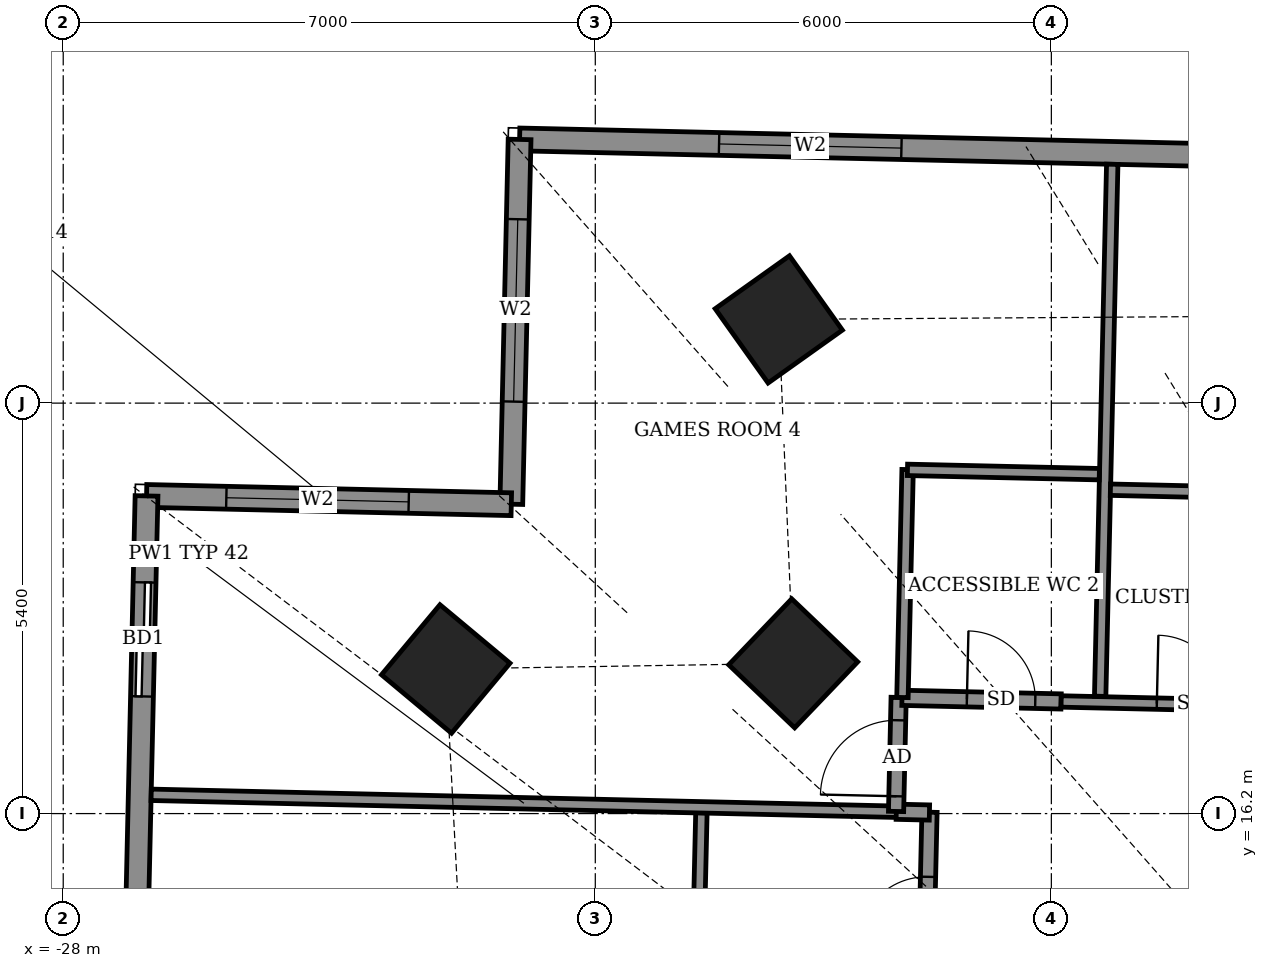
"""IFC4 building model, lengths in metres.
Left out: names, types, materials, properties, quantities, classifications, styles, units other than length and angle.
Written with IfcOpenShell. Run it as: python <this file> out.ifc"""

import sys

from ifc_helpers import new_model, si_unit, direction, frame, frame_2d, origin, origin_2d, place, context, subcontext, project, spatial, rectangle, extrude, element, fill, save


model = new_model("IFC4")
c1 = context("Model", 3, precision=1e-05, world=origin(), true_north=direction((0.0, 1.0)))
c2 = subcontext(c1, "Body", "Model", "MODEL_VIEW")
j1 = project(units=[si_unit("LENGTHUNIT", "METRE"), si_unit("PLANEANGLEUNIT", "RADIAN")], contexts=[c1])
p1 = place(None, origin())
s1 = spatial("IfcSite", under=j1, at=p1, CompositionType="ELEMENT")
p2 = place(p1, origin())
s2 = spatial("IfcBuilding", under=s1, at=p2, CompositionType="ELEMENT")
p3 = place(p2, frame((0.0, 0.0, 193.3)))
s3 = spatial("IfcBuildingStorey", under=s2, at=p3, CompositionType="ELEMENT", Elevation=193.3)
for number, where, z_axis, x_axis in (
    (1, (-18.586, 22.701, -0.55), (0.0, 0.0, 1.0), (-0.815, -0.58, 0.0)),
    (2, (-18.396, 18.177, -0.55), (0.0, 0.0, 1.0), (-0.691, -0.723, 0.0)),
    (3, (-22.968, 18.103, -0.55), (0.0, 0.0, 1.0), (-0.641, -0.768, 0.0)),
):
    element("IfcColumn", number, at=place(p3, frame(where, z_axis=z_axis, x_axis=x_axis)), inside=s3, PredefinedType="COLUMN", context=c2, shape_type="SweptSolid", body=[
        extrude(rectangle(XDim=1.2, YDim=1.2, at=origin_2d()), origin(), (0.0, 0.0, 1.0), 4.6),
    ])
p4 = place(p3, frame((20.437, 24.106, 0.0), z_axis=(0.0, 0.0, 1.0), x_axis=(-0.999742506232, 0.022691875925, 0.0)))
e4 = element("IfcWall", 4, at=p4, inside=s3, PredefinedType="SOLIDWALL", context=c2, shape_type="SweptSolid", body=[
    extrude(rectangle(XDim=42.444, YDim=0.3, at=frame_2d((21.222, 0.0))), origin(), (0.0, 0.0, 1.0), 2.65),
])
p5 = place(p4, frame((1.711, 0.0, 0.0)))
e5 = element("IfcOpeningElement", 5, at=p5, cuts=e4, PredefinedType="OPENING", context=c2, shape_type="SweptSolid", body=[
    extrude(rectangle(XDim=1.5, YDim=2.4, at=frame_2d((0.75, 1.2))), frame((0.0, 0.16, 0.0), z_axis=(0.0, -1.0, 0.0), x_axis=(1.0, 0.0, 0.0)), (0.0, 0.0, 1.0), 0.32),
])
p6 = place(p4, frame((7.769, 0.0, 0.9)))
e6 = element("IfcOpeningElement", 6, at=p6, cuts=e4, PredefinedType="OPENING", context=c2, shape_type="SweptSolid", body=[
    extrude(rectangle(XDim=2.4, YDim=1.5, at=frame_2d((1.2, 0.75))), frame((0.0, 0.16, 0.0), z_axis=(0.0, -1.0, 0.0), x_axis=(1.0, 0.0, 0.0)), (0.0, 0.0, 1.0), 0.32),
])
p7 = place(p4, frame((15.321, 0.0, 0.9)))
e7 = element("IfcOpeningElement", 7, at=p7, cuts=e4, PredefinedType="OPENING", context=c2, shape_type="SweptSolid", body=[
    extrude(rectangle(XDim=2.4, YDim=1.5, at=frame_2d((1.2, 0.75))), frame((0.0, 0.16, 0.0), z_axis=(0.0, -1.0, 0.0), x_axis=(1.0, 0.0, 0.0)), (0.0, 0.0, 1.0), 0.32),
])
p8 = place(p4, frame((22.142, 0.0, 0.0)))
e8 = element("IfcOpeningElement", 8, at=p8, cuts=e4, PredefinedType="OPENING", context=c2, shape_type="SweptSolid", body=[
    extrude(rectangle(XDim=1.5, YDim=2.4, at=frame_2d((0.75, 1.2))), frame((0.0, 0.16, 0.0), z_axis=(0.0, -1.0, 0.0), x_axis=(1.0, 0.0, 0.0)), (0.0, 0.0, 1.0), 0.32),
])
p9 = place(p4, frame((29.444, 0.0, 0.9)))
e9 = element("IfcOpeningElement", 9, at=p9, cuts=e4, PredefinedType="OPENING", context=c2, shape_type="SweptSolid", body=[
    extrude(rectangle(XDim=2.4, YDim=1.5, at=frame_2d((1.2, 0.75))), frame((0.0, 0.16, 0.0), z_axis=(0.0, -1.0, 0.0), x_axis=(1.0, 0.0, 0.0)), (0.0, 0.0, 1.0), 0.32),
])
p10 = place(p4, frame((37.419, 0.0, 0.9)))
e10 = element("IfcOpeningElement", 10, at=p10, cuts=e4, PredefinedType="OPENING", context=c2, shape_type="SweptSolid", body=[
    extrude(rectangle(XDim=2.4, YDim=1.5, at=frame_2d((1.2, 0.75))), frame((0.0, 0.16, 0.0), z_axis=(0.0, -1.0, 0.0), x_axis=(1.0, 0.0, 0.0)), (0.0, 0.0, 1.0), 0.32),
])
p11 = place(p3, frame((-21.996, 25.069, 0.0), z_axis=(0.0, 0.0, 1.0), x_axis=(-0.022683280499, -0.999742701292, 0.0)))
e11 = element("IfcWall", 11, at=p11, inside=s3, PredefinedType="SOLIDWALL", context=c2, shape_type="SweptSolid", body=[
    extrude(rectangle(XDim=4.8, YDim=0.3, at=frame_2d((2.4, 0.0))), origin(), (0.0, 0.0, 1.0), 2.85),
])
p12 = place(p11, frame((1.05, 0.0, 0.9)))
e12 = element("IfcOpeningElement", 12, at=p12, cuts=e11, PredefinedType="OPENING", context=c2, shape_type="SweptSolid", body=[
    extrude(rectangle(XDim=2.4, YDim=1.5, at=frame_2d((1.2, 0.75))), frame((0.0, 0.16, 0.0), z_axis=(0.0, -1.0, 0.0), x_axis=(1.0, 0.0, 0.0)), (0.0, 0.0, 1.0), 0.32),
])
p13 = place(p3, frame((-22.105, 20.27, 0.0), z_axis=(0.0, 0.0, 1.0), x_axis=(-0.999742701292, 0.022683280499, 0.0)))
e13 = element("IfcWall", 13, at=p13, inside=s3, PredefinedType="SOLIDWALL", context=c2, shape_type="SweptSolid", body=[
    extrude(rectangle(XDim=4.8, YDim=0.3, at=frame_2d((2.4, 0.0))), origin(), (0.0, 0.0, 1.0), 2.85),
])
p14 = place(p13, frame((1.35, 0.0, 0.9)))
e14 = element("IfcOpeningElement", 14, at=p14, cuts=e13, PredefinedType="OPENING", context=c2, shape_type="SweptSolid", body=[
    extrude(rectangle(XDim=2.4, YDim=1.5, at=frame_2d((1.2, 0.75))), frame((0.0, 0.16, 0.0), z_axis=(0.0, -1.0, 0.0), x_axis=(1.0, 0.0, 0.0)), (0.0, 0.0, 1.0), 0.32),
])
p15 = place(p3, frame((-26.904, 20.379, 0.0), z_axis=(0.0, 0.0, 1.0), x_axis=(-0.022669030322, -0.999743024514, 0.0)))
e15 = element("IfcWall", 15, at=p15, inside=s3, PredefinedType="SOLIDWALL", context=c2, shape_type="SweptSolid", body=[
    extrude(rectangle(XDim=11.33, YDim=0.3, at=frame_2d((5.665, 0.0))), origin(), (0.0, 0.0, 1.0), 2.85),
])
p16 = place(p15, frame((1.138, 0.0, 0.0)))
e16 = element("IfcOpeningElement", 16, at=p16, cuts=e15, PredefinedType="OPENING", context=c2, shape_type="SweptSolid", body=[
    extrude(rectangle(XDim=1.5, YDim=2.4, at=frame_2d((0.75, 1.2))), frame((0.0, 0.16, 0.0), z_axis=(0.0, -1.0, 0.0), x_axis=(1.0, 0.0, 0.0)), (0.0, 0.0, 1.0), 0.32),
])
p17 = place(p15, frame((6.4, 0.0, 0.9)))
e17 = element("IfcOpeningElement", 17, at=p17, cuts=e15, PredefinedType="OPENING", context=c2, shape_type="SweptSolid", body=[
    extrude(rectangle(XDim=2.4, YDim=1.5, at=frame_2d((1.2, 0.75))), frame((0.0, 0.16, 0.0), z_axis=(0.0, -1.0, 0.0), x_axis=(1.0, 0.0, 0.0)), (0.0, 0.0, 1.0), 0.32),
])
p18 = place(p3, frame((-17.247, -12.149, 0.0), z_axis=(0.0, 0.0, 1.0), x_axis=(0.022698146637, 0.999742363881, 0.0)))
e18 = element("IfcWall", 18, at=p18, inside=s3, PredefinedType="PARTITIONING", context=c2, shape_type="SweptSolid", body=[
    extrude(rectangle(XDim=28.374, YDim=0.2, at=frame_2d((14.187, 0.0))), origin(), (0.0, 0.0, 1.0), 2.85),
])
p19 = place(p18, frame((22.9, 0.0, 0.0)))
e19 = element("IfcOpeningElement", 19, at=p19, cuts=e18, PredefinedType="OPENING", context=c2, shape_type="SweptSolid", body=[
    extrude(rectangle(XDim=1.0, YDim=2.1, at=frame_2d((0.5, 1.05))), frame((0.0, 0.11, 0.0), z_axis=(0.0, -1.0, 0.0), x_axis=(1.0, 0.0, 0.0)), (0.0, 0.0, 1.0), 0.22),
])
p20 = place(p18, frame((26.624, 0.0, 0.0)))
e20 = element("IfcOpeningElement", 20, at=p20, cuts=e18, PredefinedType="OPENING", context=c2, shape_type="SweptSolid", body=[
    extrude(rectangle(XDim=0.9, YDim=2.1, at=frame_2d((0.45, 1.05))), frame((0.0, 0.11, 0.0), z_axis=(0.0, -1.0, 0.0), x_axis=(1.0, 0.0, 0.0)), (0.0, 0.0, 1.0), 0.22),
])
p21 = place(p18, frame((16.5, 0.0, 0.0)))
e21 = element("IfcOpeningElement", 21, at=p21, cuts=e18, PredefinedType="OPENING", context=c2, shape_type="SweptSolid", body=[
    extrude(rectangle(XDim=1.0, YDim=2.1, at=frame_2d((0.5, 1.05))), frame((0.0, 0.11, 0.0), z_axis=(0.0, -1.0, 0.0), x_axis=(1.0, 0.0, 0.0)), (0.0, 0.0, 1.0), 0.22),
])
p22 = place(p18, frame((19.275, 0.0, 0.0)))
e22 = element("IfcOpeningElement", 22, at=p22, cuts=e18, PredefinedType="OPENING", context=c2, shape_type="SweptSolid", body=[
    extrude(rectangle(XDim=0.9, YDim=2.1, at=frame_2d((0.45, 1.05))), frame((0.0, 0.11, 0.0), z_axis=(0.0, -1.0, 0.0), x_axis=(1.0, 0.0, 0.0)), (0.0, 0.0, 1.0), 0.22),
])
p23 = place(p18, frame((14.0, 0.0, 0.0)))
e23 = element("IfcOpeningElement", 23, at=p23, cuts=e18, PredefinedType="OPENING", context=c2, shape_type="SweptSolid", body=[
    extrude(rectangle(XDim=1.0, YDim=2.1, at=frame_2d((0.5, 1.05))), frame((0.0, 0.11, 0.0), z_axis=(0.0, -1.0, 0.0), x_axis=(1.0, 0.0, 0.0)), (0.0, 0.0, 1.0), 0.22),
])
p24 = place(p18, frame((11.775, 0.0, 0.0)))
e24 = element("IfcOpeningElement", 24, at=p24, cuts=e18, PredefinedType="OPENING", context=c2, shape_type="SweptSolid", body=[
    extrude(rectangle(XDim=0.9, YDim=2.1, at=frame_2d((0.45, 1.05))), frame((0.0, 0.11, 0.0), z_axis=(0.0, -1.0, 0.0), x_axis=(1.0, 0.0, 0.0)), (0.0, 0.0, 1.0), 0.22),
])
p25 = place(p18, frame((8.712, 0.0, 0.0)))
e25 = element("IfcOpeningElement", 25, at=p25, cuts=e18, PredefinedType="OPENING", context=c2, shape_type="SweptSolid", body=[
    extrude(rectangle(XDim=1.0, YDim=2.1, at=frame_2d((0.5, 1.05))), frame((0.0, 0.11, 0.0), z_axis=(0.0, -1.0, 0.0), x_axis=(1.0, 0.0, 0.0)), (0.0, 0.0, 1.0), 0.22),
])
p26 = place(p18, frame((3.138, 0.0, 0.0)))
e26 = element("IfcOpeningElement", 26, at=p26, cuts=e18, PredefinedType="OPENING", context=c2, shape_type="SweptSolid", body=[
    extrude(rectangle(XDim=1.0, YDim=2.1, at=frame_2d((0.5, 1.05))), frame((0.0, 0.11, 0.0), z_axis=(0.0, -1.0, 0.0), x_axis=(1.0, 0.0, 0.0)), (0.0, 0.0, 1.0), 0.22),
])
p27 = place(p3, frame((-19.662, 13.687, 0.0), z_axis=(0.0, 0.0, 1.0), x_axis=(0.023015762656, 0.999735102249, 0.0)))
e27 = element("IfcWall", 27, at=p27, inside=s3, PredefinedType="PARTITIONING", context=c2, shape_type="SweptSolid", body=[
    extrude(rectangle(XDim=2.525, YDim=0.15, at=frame_2d((1.262, 0.0))), origin(), (0.0, 0.0, 1.0), 2.85),
])
p28 = place(p3, frame((-26.843, 16.447, 0.0), z_axis=(0.0, 0.0, 1.0), x_axis=(0.999741809847, -0.022722536032, 0.0)))
e28 = element("IfcWall", 28, at=p28, inside=s3, PredefinedType="PARTITIONING", context=c2, shape_type="SweptSolid", body=[
    extrude(rectangle(XDim=9.81, YDim=0.15, at=frame_2d((4.905, 0.0))), origin(), (0.0, 0.0, 1.0), 2.65),
])
p29 = place(p3, frame((-17.04, 16.224, 0.0), z_axis=(0.0, 0.0, 1.0), x_axis=(0.999736607625, -0.022950280466, 0.0)))
e29 = element("IfcWall", 29, at=p29, inside=s3, PredefinedType="PARTITIONING", context=c2, shape_type="SweptSolid", body=[
    extrude(rectangle(XDim=0.436, YDim=0.2, at=frame_2d((0.218, 0.0))), origin(), (0.0, 0.0, 1.0), 2.85),
])
p30 = place(p3, frame((-17.043, 16.228, 0.0), z_axis=(0.0, 0.0, 1.0), x_axis=(0.022617910375, 0.999744182344, 0.0)))
e30 = element("IfcWall", 30, at=p30, inside=s3, PredefinedType="PARTITIONING", context=c2, shape_type="SweptSolid", body=[
    extrude(rectangle(XDim=1.5, YDim=0.2, at=frame_2d((0.75, 0.0))), origin(), (0.0, 0.0, 1.0), 2.85),
])
p31 = place(p30, frame((0.2, 0.0, 0.0)))
e31 = element("IfcOpeningElement", 31, at=p31, cuts=e30, PredefinedType="OPENING", context=c2, shape_type="SweptSolid", body=[
    extrude(rectangle(XDim=1.0, YDim=2.1, at=frame_2d((0.5, 1.05))), frame((0.0, 0.11, 0.0), z_axis=(0.0, -1.0, 0.0), x_axis=(1.0, 0.0, 0.0)), (0.0, 0.0, 1.0), 0.22),
])
p32 = place(p3, frame((-16.965, 17.723, 0.0), z_axis=(0.0, 0.0, 1.0), x_axis=(0.999738756022, -0.022856502529, 0.0)))
e32 = element("IfcWall", 32, at=p32, inside=s3, PredefinedType="PARTITIONING", context=c2, shape_type="SweptSolid", body=[
    extrude(rectangle(XDim=2.094, YDim=0.2, at=frame_2d((1.047, 0.0))), origin(), (0.0, 0.0, 1.0), 2.85),
])
p33 = place(p32, frame((0.854, 0.0, 0.0)))
e33 = element("IfcOpeningElement", 33, at=p33, cuts=e32, PredefinedType="OPENING", context=c2, shape_type="SweptSolid", body=[
    extrude(rectangle(XDim=0.9, YDim=2.1, at=frame_2d((0.45, 1.05))), frame((0.0, 0.11, 0.0), z_axis=(0.0, -1.0, 0.0), x_axis=(1.0, 0.0, 0.0)), (0.0, 0.0, 1.0), 0.22),
])
p34 = place(p3, frame((-14.871, 17.675, 0.0), z_axis=(0.0, 0.0, 1.0), x_axis=(0.999742359486, -0.02269834024, 0.0)))
e34 = element("IfcWall", 34, at=p34, inside=s3, PredefinedType="PARTITIONING", context=c2, shape_type="SweptSolid", body=[
    extrude(rectangle(XDim=30.536, YDim=0.15, at=frame_2d((15.268, 0.0))), origin(), (0.0, 0.0, 1.0), 2.55),
])
p35 = place(p34, frame((24.184, 0.0, 0.0)))
e35 = element("IfcOpeningElement", 35, at=p35, cuts=e34, PredefinedType="OPENING", context=c2, shape_type="SweptSolid", body=[
    extrude(rectangle(XDim=1.0, YDim=2.1, at=frame_2d((0.5, 1.05))), frame((0.0, 0.085, 0.0), z_axis=(0.0, -1.0, 0.0), x_axis=(1.0, 0.0, 0.0)), (0.0, 0.0, 1.0), 0.17),
])
p36 = place(p34, frame((27.359, 0.0, 0.0)))
e36 = element("IfcOpeningElement", 36, at=p36, cuts=e34, PredefinedType="OPENING", context=c2, shape_type="SweptSolid", body=[
    extrude(rectangle(XDim=0.9, YDim=2.1, at=frame_2d((0.45, 1.05))), frame((0.0, 0.085, 0.0), z_axis=(0.0, -1.0, 0.0), x_axis=(1.0, 0.0, 0.0)), (0.0, 0.0, 1.0), 0.17),
])
p37 = place(p34, frame((19.459, 0.0, 0.0)))
e37 = element("IfcOpeningElement", 37, at=p37, cuts=e34, PredefinedType="OPENING", context=c2, shape_type="SweptSolid", body=[
    extrude(rectangle(XDim=1.0, YDim=2.1, at=frame_2d((0.5, 1.05))), frame((0.0, 0.085, 0.0), z_axis=(0.0, -1.0, 0.0), x_axis=(1.0, 0.0, 0.0)), (0.0, 0.0, 1.0), 0.17),
])
p38 = place(p34, frame((15.509, 0.0, 0.0)))
e38 = element("IfcOpeningElement", 38, at=p38, cuts=e34, PredefinedType="OPENING", context=c2, shape_type="SweptSolid", body=[
    extrude(rectangle(XDim=0.9, YDim=2.1, at=frame_2d((0.45, 1.05))), frame((0.0, 0.085, 0.0), z_axis=(0.0, -1.0, 0.0), x_axis=(1.0, 0.0, 0.0)), (0.0, 0.0, 1.0), 0.17),
])
p39 = place(p34, frame((11.134, 0.0, 0.0)))
e39 = element("IfcOpeningElement", 39, at=p39, cuts=e34, PredefinedType="OPENING", context=c2, shape_type="SweptSolid", body=[
    extrude(rectangle(XDim=1.0, YDim=2.1, at=frame_2d((0.5, 1.05))), frame((0.0, 0.085, 0.0), z_axis=(0.0, -1.0, 0.0), x_axis=(1.0, 0.0, 0.0)), (0.0, 0.0, 1.0), 0.17),
])
p40 = place(p34, frame((5.209, 0.0, 0.0)))
e40 = element("IfcOpeningElement", 40, at=p40, cuts=e34, PredefinedType="OPENING", context=c2, shape_type="SweptSolid", body=[
    extrude(rectangle(XDim=1.0, YDim=2.1, at=frame_2d((0.5, 1.05))), frame((0.0, 0.085, 0.0), z_axis=(0.0, -1.0, 0.0), x_axis=(1.0, 0.0, 0.0)), (0.0, 0.0, 1.0), 0.17),
])
p41 = place(p34, frame((1.259, 0.0, 0.0)))
e41 = element("IfcOpeningElement", 41, at=p41, cuts=e34, PredefinedType="OPENING", context=c2, shape_type="SweptSolid", body=[
    extrude(rectangle(XDim=0.9, YDim=2.1, at=frame_2d((0.45, 1.05))), frame((0.0, 0.085, 0.0), z_axis=(0.0, -1.0, 0.0), x_axis=(1.0, 0.0, 0.0)), (0.0, 0.0, 1.0), 0.17),
])
p42 = place(p3, frame((-16.959, 17.727, 0.0), z_axis=(0.0, 0.0, 1.0), x_axis=(0.022625271604, 0.999744015778, 0.0)))
e42 = element("IfcWall", 42, at=p42, inside=s3, PredefinedType="PARTITIONING", context=c2, shape_type="SweptSolid", body=[
    extrude(rectangle(XDim=3.0, YDim=0.15, at=frame_2d((1.5, 0.0))), origin(), (0.0, 0.0, 1.0), 2.85),
])
p43 = place(p3, frame((-14.358, 17.743, 0.0), z_axis=(0.0, 0.0, 1.0), x_axis=(0.022702393474, 0.999742267452, 0.0)))
e43 = element("IfcWall", 43, at=p43, inside=s3, PredefinedType="PARTITIONING", context=c2, shape_type="SweptSolid", body=[
    extrude(rectangle(XDim=7.001, YDim=0.15, at=frame_2d((3.5, 0.0))), origin(), (0.0, 0.0, 1.0), 2.65),
])
p44 = place(p3, frame((-14.223, 20.461, 0.0), z_axis=(0.0, 0.0, 1.0), x_axis=(0.999740260747, -0.02279059109, 0.0)))
e44 = element("IfcWall", 44, at=p44, inside=s3, PredefinedType="PARTITIONING", context=c2, shape_type="SweptSolid", body=[
    extrude(rectangle(XDim=2.324, YDim=0.15, at=frame_2d((1.162, 0.0))), origin(), (0.0, 0.0, 1.0), 2.75),
])
p45 = place(p3, frame((-16.893, 20.722, 0.0), z_axis=(0.0, 0.0, 1.0), x_axis=(0.999746160391, -0.022530308093, 0.0)))
e45 = element("IfcWall", 45, at=p45, inside=s3, PredefinedType="PARTITIONING", context=c2, shape_type="SweptSolid", body=[
    extrude(rectangle(XDim=2.525, YDim=0.15, at=frame_2d((1.262, 0.0))), origin(), (0.0, 0.0, 1.0), 4.05),
])
p46 = place(p10, origin())
e46 = element("IfcWindow", 46, at=p46, inside=s3, PartitioningType="DOUBLE_PANEL_VERTICAL", PredefinedType="WINDOW", context=c2, shape_type="SweptSolid", body=[
    extrude(rectangle(XDim=2.4, YDim=1.5, at=frame_2d((1.2, 0.75))), frame((0.0, 0.03, 0.0), z_axis=(0.0, -1.0, 0.0), x_axis=(1.0, 0.0, 0.0)), (0.0, 0.0, 1.0), 0.06),
])
fill(e10, e46)
p47 = place(p12, origin())
e47 = element("IfcWindow", 47, at=p47, inside=s3, PartitioningType="DOUBLE_PANEL_VERTICAL", PredefinedType="WINDOW", context=c2, shape_type="SweptSolid", body=[
    extrude(rectangle(XDim=2.4, YDim=1.5, at=frame_2d((1.2, 0.75))), frame((0.0, 0.03, 0.0), z_axis=(0.0, -1.0, 0.0), x_axis=(1.0, 0.0, 0.0)), (0.0, 0.0, 1.0), 0.06),
])
fill(e12, e47)
p48 = place(p14, origin())
e48 = element("IfcWindow", 48, at=p48, inside=s3, PartitioningType="DOUBLE_PANEL_VERTICAL", PredefinedType="WINDOW", context=c2, shape_type="SweptSolid", body=[
    extrude(rectangle(XDim=2.4, YDim=1.5, at=frame_2d((1.2, 0.75))), frame((0.0, 0.03, 0.0), z_axis=(0.0, -1.0, 0.0), x_axis=(1.0, 0.0, 0.0)), (0.0, 0.0, 1.0), 0.06),
])
fill(e14, e48)
p49 = place(p16, origin())
e49 = element("IfcDoor", 49, at=p49, inside=s3, OperationType="SLIDING_TO_LEFT", PredefinedType="DOOR", context=c2, shape_type="SweptSolid", body=[
    extrude(rectangle(XDim=1.5, YDim=2.4, at=frame_2d((0.75, 1.2))), frame((0.0, 0.025, 0.0), z_axis=(0.0, -1.0, 0.0), x_axis=(1.0, 0.0, 0.0)), (0.0, 0.0, 1.0), 0.05),
])
fill(e16, e49)
p50 = place(p41, origin())
e50 = element("IfcDoor", 50, at=p50, inside=s3, OperationType="SINGLE_SWING_LEFT", PredefinedType="DOOR", context=c2, shape_type="SweptSolid", body=[
    extrude(rectangle(XDim=0.9, YDim=2.1, at=frame_2d((0.45, 1.05))), frame((0.0, 0.025, 0.0), z_axis=(0.0, -1.0, 0.0), x_axis=(1.0, 0.0, 0.0)), (0.0, 0.0, 1.0), 0.05),
])
fill(e41, e50)
p51 = place(p31, origin())
e51 = element("IfcDoor", 51, at=p51, inside=s3, OperationType="SINGLE_SWING_LEFT", PredefinedType="DOOR", context=c2, shape_type="SweptSolid", body=[
    extrude(rectangle(XDim=1.0, YDim=2.1, at=frame_2d((0.5, 1.05))), frame((0.0, 0.025, 0.0), z_axis=(0.0, -1.0, 0.0), x_axis=(1.0, 0.0, 0.0)), (0.0, 0.0, 1.0), 0.05),
])
fill(e31, e51)
p52 = place(p33, origin())
e52 = element("IfcDoor", 52, at=p52, inside=s3, OperationType="SINGLE_SWING_RIGHT", PredefinedType="DOOR", context=c2, shape_type="SweptSolid", body=[
    extrude(rectangle(XDim=0.9, YDim=2.1, at=frame_2d((0.45, 1.05))), frame((0.0, 0.025, 0.0), z_axis=(0.0, -1.0, 0.0), x_axis=(1.0, 0.0, 0.0)), (0.0, 0.0, 1.0), 0.05),
])
fill(e33, e52)
p53 = place(p20, origin())
e53 = element("IfcDoor", 53, at=p53, inside=s3, OperationType="SINGLE_SWING_LEFT", PredefinedType="DOOR", context=c2, shape_type="SweptSolid", body=[
    extrude(rectangle(XDim=0.9, YDim=2.1, at=frame_2d((0.45, 1.05))), frame((0.0, 0.025, 0.0), z_axis=(0.0, -1.0, 0.0), x_axis=(1.0, 0.0, 0.0)), (0.0, 0.0, 1.0), 0.05),
])
fill(e20, e53)
save(model, sys.argv[1])
